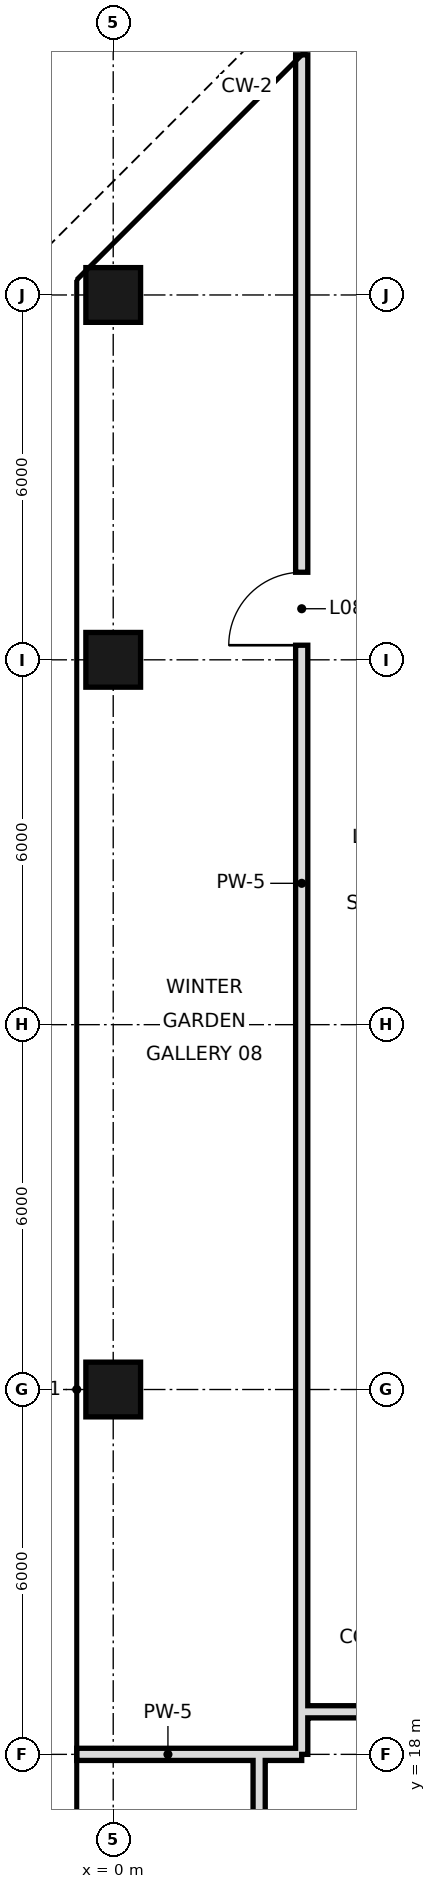
"""IFC4 building model, lengths in metres.
Left out: names, types, materials, properties, quantities, classifications, styles, units other than length and angle.
Written with IfcOpenShell. Run it as: python <this file> out.ifc"""

import sys

from ifc_helpers import new_model, si_unit, direction, frame, frame_2d, origin, origin_2d, place, context, subcontext, project, spatial, rectangle, hollow_rectangle, extrude, element, fill, save


model = new_model("IFC4")
c1 = context("Model", 3, precision=1e-05, world=origin(), true_north=direction((0.0, 1.0)))
c2 = subcontext(c1, "Body", "Model", "MODEL_VIEW")
j1 = project(units=[si_unit("LENGTHUNIT", "METRE"), si_unit("PLANEANGLEUNIT", "RADIAN")], contexts=[c1])
p1 = place(None, origin())
s1 = spatial("IfcSite", under=j1, at=p1, CompositionType="ELEMENT")
p2 = place(p1, origin())
s2 = spatial("IfcBuilding", under=s1, at=p2, CompositionType="ELEMENT")
p3 = place(p2, frame((0.0, 0.0, 49.8)))
s3 = spatial("IfcBuildingStorey", under=s2, at=p3, CompositionType="ELEMENT", Elevation=49.8)
for number, where, z_axis, x_axis in (
    (1, (0.0, 24.0, 0.0), (0.0, 0.0, 1.0), (1.0, 0.0, 0.0)),
    (2, (0.0, 36.0, 0.0), (0.0, 0.0, 1.0), (1.0, 0.0, 0.0)),
    (3, (0.0, 42.0, 0.0), (0.0, 0.0, 1.0), (1.0, 0.0, 0.0)),
):
    element("IfcColumn", number, at=place(p3, frame(where, z_axis=z_axis, x_axis=x_axis)), inside=s3, PredefinedType="COLUMN", context=c2, shape_type="SweptSolid", body=[
        extrude(hollow_rectangle(XDim=0.9, YDim=0.9, WallThickness=0.045, at=origin_2d()), origin(), (0.0, 0.0, 1.0), 3.6),
    ])
p4 = place(p3, frame((2.4, 10.8, 0.0), z_axis=(0.0, 0.0, 1.0), x_axis=(0.0, 1.0, 0.0)))
e4 = element("IfcWall", 4, at=p4, inside=s3, PredefinedType="SOLIDWALL", context=c2, shape_type="SweptSolid", body=[
    extrude(rectangle(XDim=7.2, YDim=0.2, at=frame_2d((3.6, 0.0))), origin(), (0.0, 0.0, 1.0), 2.72),
])
p5 = place(p3, frame((3.1, 18.7, 0.0), z_axis=(0.0, 0.0, 1.0), x_axis=(0.0, 1.0, 0.0)))
e5 = element("IfcWall", 5, at=p5, inside=s3, PredefinedType="SOLIDWALL", context=c2, shape_type="SweptSolid", body=[
    extrude(rectangle(XDim=27.249, YDim=0.2, at=frame_2d((13.625, 0.0))), origin(), (0.0, 0.0, 1.0), 2.97),
])
p6 = place(p5, frame((17.54, 0.0, 0.0)))
e6 = element("IfcOpeningElement", 6, at=p6, cuts=e5, PredefinedType="OPENING", context=c2, shape_type="SweptSolid", body=[
    extrude(rectangle(XDim=1.2, YDim=2.4, at=frame_2d((0.6, 1.2))), frame((0.0, 0.11, 0.0), z_axis=(0.0, -1.0, 0.0), x_axis=(1.0, 0.0, 0.0)), (0.0, 0.0, 1.0), 0.22),
])
p7 = place(p3, frame((3.1, 18.0, 0.0), z_axis=(0.0, 0.0, 1.0), x_axis=(0.0, 1.0, 0.0)))
e7 = element("IfcWall", 7, at=p7, inside=s3, PredefinedType="SOLIDWALL", context=c2, shape_type="SweptSolid", body=[
    extrude(rectangle(XDim=0.7, YDim=0.2, at=frame_2d((0.35, 0.0))), origin(), (0.0, 0.0, 1.0), 2.97),
])
p8 = place(p3, frame((-0.6, 18.0, 0.0), z_axis=(0.0, 0.0, 1.0), x_axis=(1.0, 0.0, 0.0)))
e8 = element("IfcWall", 8, at=p8, inside=s3, PredefinedType="SOLIDWALL", context=c2, shape_type="SweptSolid", body=[
    extrude(rectangle(XDim=3.0, YDim=0.2, at=frame_2d((1.5, 0.0))), origin(), (0.0, 0.0, 1.0), 2.72),
])
p9 = place(p3, frame((2.4, 18.0, 0.0), z_axis=(0.0, 0.0, 1.0), x_axis=(1.0, 0.0, 0.0)))
e9 = element("IfcWall", 9, at=p9, inside=s3, PredefinedType="SOLIDWALL", context=c2, shape_type="SweptSolid", body=[
    extrude(rectangle(XDim=0.7, YDim=0.2, at=frame_2d((0.35, 0.0))), origin(), (0.0, 0.0, 1.0), 2.97),
])
p10 = place(p3, frame((3.1, 18.7, 0.0), z_axis=(0.0, 0.0, 1.0), x_axis=(1.0, 0.0, 0.0)))
e10 = element("IfcWall", 10, at=p10, inside=s3, PredefinedType="SOLIDWALL", context=c2, shape_type="SweptSolid", body=[
    extrude(rectangle(XDim=3.5, YDim=0.2, at=frame_2d((1.75, 0.0))), origin(), (0.0, 0.0, 1.0), 2.72),
])
p11 = place(p6, origin())
e11 = element("IfcDoor", 11, at=p11, inside=s3, OperationType="SINGLE_SWING_LEFT", PredefinedType="DOOR", context=c2, shape_type="SweptSolid", body=[
    extrude(rectangle(XDim=1.2, YDim=2.4, at=frame_2d((0.6, 1.2))), frame((0.0, 0.025, 0.0), z_axis=(0.0, -1.0, 0.0), x_axis=(1.0, 0.0, 0.0)), (0.0, 0.0, 1.0), 0.05),
])
fill(e6, e11)
save(model, sys.argv[1])
